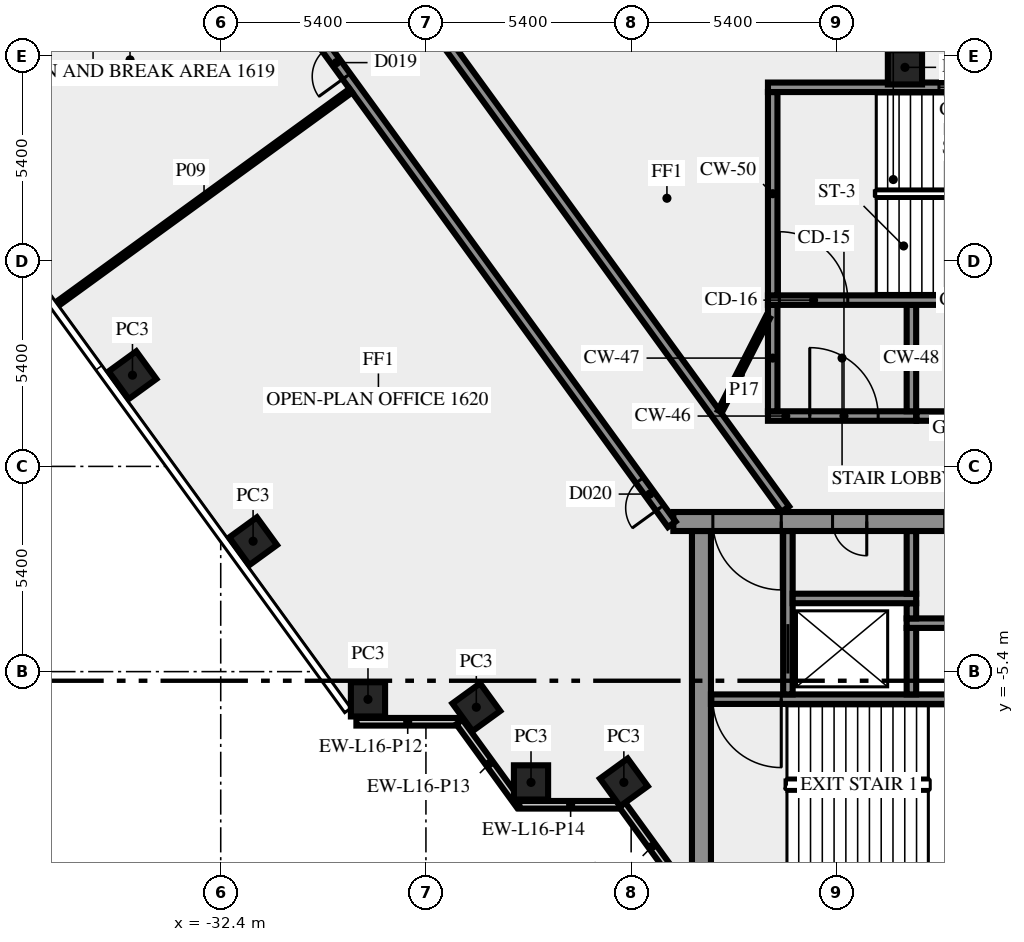
"""IFC4 building model, lengths in metres.
Left out: names, types, materials, properties, quantities, classifications, styles, units other than length and angle.
Written with IfcOpenShell. Run it as: python <this file> out.ifc"""

import sys

from ifc_helpers import new_model, si_unit, direction, frame, frame_2d, origin, origin_2d, place, context, subcontext, project, spatial, rectangle, extrude, element, fill, save


model = new_model("IFC4")
c1 = context("Model", 3, precision=1e-05, world=origin(), true_north=direction((0.0, 1.0)))
c2 = subcontext(c1, "Body", "Model", "MODEL_VIEW")
j1 = project(units=[si_unit("LENGTHUNIT", "METRE"), si_unit("PLANEANGLEUNIT", "RADIAN")], contexts=[c1])
p1 = place(None, origin())
s1 = spatial("IfcSite", under=j1, at=p1, CompositionType="ELEMENT")
p2 = place(p1, origin())
s2 = spatial("IfcBuilding", under=s1, at=p2, CompositionType="ELEMENT")
p3 = place(p2, frame((0.0, 0.0, 71.0)))
s3 = spatial("IfcBuildingStorey", under=s2, at=p3, CompositionType="ELEMENT", Elevation=71.0)
for number, where, z_axis, x_axis in (
    (1, (-34.722, 2.4, 0.0), (0.0, 0.0, 1.0), (0.588, -0.809, 0.0)),
    (2, (-31.548, -1.969, 0.0), (0.0, 0.0, 1.0), (0.588, -0.809, 0.0)),
    (3, (-28.525, -6.13, 0.0), (0.0, 0.0, 1.0), (1.0, 0.0, 0.0)),
    (4, (-25.674, -6.337, 0.0), (0.0, 0.0, 1.0), (0.588, -0.809, 0.0)),
    (5, (-24.235, -8.315, 0.0), (0.0, 0.0, 1.0), (1.0, 0.0, 0.0)),
    (6, (-21.792, -8.315, 0.0), (0.0, 0.0, 1.0), (0.588, -0.809, 0.0)),
    (7, (-14.395, 10.5, 0.0), (0.0, 0.0, 1.0), (-1.0, 0.0, 0.0)),
):
    element("IfcColumn", number, at=place(p3, frame(where, z_axis=z_axis, x_axis=x_axis)), inside=s3, PredefinedType="COLUMN", context=c2, shape_type="SweptSolid", body=[
        extrude(rectangle(XDim=0.9, YDim=0.9, at=origin_2d()), origin(), (0.0, 0.0, 1.0), 3.65),
    ])
p4 = place(p3, frame((-28.83, -6.719, 0.0), z_axis=(0.0, 0.0, 1.0), x_axis=(1.0, 0.0, 0.0)))
e8 = element("IfcWall", 8, at=p4, inside=s3, PredefinedType="SOLIDWALL", context=c2, shape_type="SweptSolid", body=[
    extrude(rectangle(XDim=2.7, YDim=0.2, at=frame_2d((1.35, 0.0))), origin(), (0.0, 0.0, 1.0), 3.65),
])
p5 = place(p3, frame((-26.12, -6.724, 0.0), z_axis=(0.0, 0.0, 1.0), x_axis=(0.587720002413, -0.809064397168, 0.0)))
e9 = element("IfcWall", 9, at=p5, inside=s3, PredefinedType="SOLIDWALL", context=c2, shape_type="SweptSolid", body=[
    extrude(rectangle(XDim=2.7, YDim=0.2, at=frame_2d((1.35, 0.0))), origin(), (0.0, 0.0, 1.0), 3.65),
])
p6 = place(p3, frame((-24.543, -8.904, 0.0), z_axis=(0.0, 0.0, 1.0), x_axis=(1.0, 0.0, 0.0)))
e10 = element("IfcWall", 10, at=p6, inside=s3, PredefinedType="SOLIDWALL", context=c2, shape_type="SweptSolid", body=[
    extrude(rectangle(XDim=2.7, YDim=0.2, at=frame_2d((1.35, 0.0))), origin(), (0.0, 0.0, 1.0), 3.65),
])
p7 = place(p3, frame((-21.833, -8.909, 0.0), z_axis=(0.0, 0.0, 1.0), x_axis=(0.587766567315, -0.809030569476, 0.0)))
e11 = element("IfcWall", 11, at=p7, inside=s3, PredefinedType="SOLIDWALL", context=c2, shape_type="SweptSolid", body=[
    extrude(rectangle(XDim=2.688, YDim=0.2, at=frame_2d((1.344, 0.0))), origin(), (0.0, 0.0, 1.0), 3.65),
])
p8 = place(p3, frame((-19.75, -10.5, 0.0), z_axis=(0.0, 0.0, 1.0), x_axis=(0.0, 1.0, 0.0)))
e12 = element("IfcWall", 12, at=p8, inside=s3, PredefinedType="SHEAR", context=c2, shape_type="SweptSolid", body=[
    extrude(rectangle(XDim=8.8, YDim=0.5, at=frame_2d((4.4, 0.0))), origin(), (0.0, 0.0, 1.0), 3.65),
])
p9 = place(p3, frame((-11.45, -6.125, 0.0), z_axis=(0.0, 0.0, 1.0), x_axis=(-1.0, 0.0, 0.0)))
e13 = element("IfcWall", 13, at=p9, inside=s3, PredefinedType="SHEAR", context=c2, shape_type="SweptSolid", body=[
    extrude(rectangle(XDim=8.05, YDim=0.25, at=frame_2d((4.025, 0.0))), origin(), (0.0, 0.0, 1.0), 3.65),
])
p10 = place(p9, frame((6.2, 0.0, 0.0)))
e14 = element("IfcOpeningElement", 14, at=p10, cuts=e13, PredefinedType="OPENING", context=c2, shape_type="SweptSolid", body=[
    extrude(rectangle(XDim=1.8, YDim=2.1, at=frame_2d((0.9, 1.05))), frame((0.0, 0.135, 0.0), z_axis=(0.0, -1.0, 0.0), x_axis=(1.0, 0.0, 0.0)), (0.0, 0.0, 1.0), 0.27),
])
p11 = place(p3, frame((-17.475, -6.0, 0.0), z_axis=(0.0, 0.0, 1.0), x_axis=(0.0, 1.0, 0.0)))
e15 = element("IfcWall", 15, at=p11, inside=s3, PredefinedType="SHEAR", context=c2, shape_type="SweptSolid", body=[
    extrude(rectangle(XDim=4.3, YDim=0.25, at=frame_2d((2.15, 0.0))), origin(), (0.0, 0.0, 1.0), 3.65),
])
p12 = place(p11, frame((0.55, 0.0, 0.0)))
e16 = element("IfcOpeningElement", 16, at=p12, cuts=e15, PredefinedType="OPENING", context=c2, shape_type="SweptSolid", body=[
    extrude(rectangle(XDim=1.3, YDim=2.1, at=frame_2d((0.65, 1.05))), frame((0.0, 0.135, 0.0), z_axis=(0.0, -1.0, 0.0), x_axis=(1.0, 0.0, 0.0)), (0.0, 0.0, 1.0), 0.27),
])
p13 = place(p3, frame((-14.225, -6.0, 0.0), z_axis=(0.0, 0.0, 1.0), x_axis=(0.0, 1.0, 0.0)))
e17 = element("IfcWall", 17, at=p13, inside=s3, PredefinedType="SHEAR", context=c2, shape_type="SweptSolid", body=[
    extrude(rectangle(XDim=1.75, YDim=0.25, at=frame_2d((0.875, 0.0))), origin(), (0.0, 0.0, 1.0), 3.65),
])
p14 = place(p3, frame((-14.35, -4.125, 0.0), z_axis=(0.0, 0.0, 1.0), x_axis=(1.0, 0.0, 0.0)))
e18 = element("IfcWall", 18, at=p14, inside=s3, PredefinedType="SHEAR", context=c2, shape_type="SweptSolid", body=[
    extrude(rectangle(XDim=10.4, YDim=0.25, at=frame_2d((5.2, 0.0))), origin(), (0.0, 0.0, 1.0), 3.65),
])
p15 = place(p14, frame((3.5, 0.0, 0.0)))
e19 = element("IfcOpeningElement", 19, at=p15, cuts=e18, PredefinedType="OPENING", context=c2, shape_type="SweptSolid", body=[
    extrude(rectangle(XDim=1.1, YDim=2.1, at=frame_2d((0.55, 1.05))), frame((0.0, 0.135, 0.0), z_axis=(0.0, -1.0, 0.0), x_axis=(1.0, 0.0, 0.0)), (0.0, 0.0, 1.0), 0.27),
])
p16 = place(p14, frame((6.0, 0.0, 0.0)))
e20 = element("IfcOpeningElement", 20, at=p16, cuts=e18, PredefinedType="OPENING", context=c2, shape_type="SweptSolid", body=[
    extrude(rectangle(XDim=1.1, YDim=2.1, at=frame_2d((0.55, 1.05))), frame((0.0, 0.135, 0.0), z_axis=(0.0, -1.0, 0.0), x_axis=(1.0, 0.0, 0.0)), (0.0, 0.0, 1.0), 0.27),
])
p17 = place(p14, frame((8.5, 0.0, 0.0)))
e21 = element("IfcOpeningElement", 21, at=p17, cuts=e18, PredefinedType="OPENING", context=c2, shape_type="SweptSolid", body=[
    extrude(rectangle(XDim=1.1, YDim=2.1, at=frame_2d((0.55, 1.05))), frame((0.0, 0.135, 0.0), z_axis=(0.0, -1.0, 0.0), x_axis=(1.0, 0.0, 0.0)), (0.0, 0.0, 1.0), 0.27),
])
p18 = place(p3, frame((-14.225, -4.0, 0.0), z_axis=(0.0, 0.0, 1.0), x_axis=(0.0, 1.0, 0.0)))
e22 = element("IfcWall", 22, at=p18, inside=s3, PredefinedType="SHEAR", context=c2, shape_type="SweptSolid", body=[
    extrude(rectangle(XDim=0.4, YDim=0.25, at=frame_2d((0.2, 0.0))), origin(), (0.0, 0.0, 1.0), 3.65),
])
p19 = place(p3, frame((-17.35, -3.475, 0.0), z_axis=(0.0, 0.0, 1.0), x_axis=(1.0, 0.0, 0.0)))
e23 = element("IfcWall", 23, at=p19, inside=s3, PredefinedType="SHEAR", context=c2, shape_type="SweptSolid", body=[
    extrude(rectangle(XDim=3.25, YDim=0.25, at=frame_2d((1.625, 0.0))), origin(), (0.0, 0.0, 1.0), 3.65),
])
p20 = place(p3, frame((-14.225, -3.35, 0.0), z_axis=(0.0, 0.0, 1.0), x_axis=(0.0, 1.0, 0.0)))
e24 = element("IfcWall", 24, at=p20, inside=s3, PredefinedType="SHEAR", context=c2, shape_type="SweptSolid", body=[
    extrude(rectangle(XDim=1.65, YDim=0.25, at=frame_2d((0.825, 0.0))), origin(), (0.0, 0.0, 1.0), 3.65),
])
p21 = place(p3, frame((20.49, -1.45, 0.0), z_axis=(0.0, 0.0, 1.0), x_axis=(-1.0, 0.0, 0.0)))
e25 = element("IfcWall", 25, at=p21, inside=s3, PredefinedType="SHEAR", context=c2, shape_type="SweptSolid", body=[
    extrude(rectangle(XDim=40.98, YDim=0.5, at=frame_2d((20.49, 0.0))), origin(), (0.0, 0.0, 1.0), 3.65),
])
p22 = place(p21, frame((38.14, 0.0, 0.0)))
e26 = element("IfcOpeningElement", 26, at=p22, cuts=e25, PredefinedType="OPENING", context=c2, shape_type="SweptSolid", body=[
    extrude(rectangle(XDim=1.8, YDim=2.1, at=frame_2d((0.9, 1.05))), frame((0.0, 0.26, 0.0), z_axis=(0.0, -1.0, 0.0), x_axis=(1.0, 0.0, 0.0)), (0.0, 0.0, 1.0), 0.52),
])
p23 = place(p21, frame((35.89, 0.0, 0.0)))
e27 = element("IfcOpeningElement", 27, at=p23, cuts=e25, PredefinedType="OPENING", context=c2, shape_type="SweptSolid", body=[
    extrude(rectangle(XDim=0.9, YDim=2.1, at=frame_2d((0.45, 1.05))), frame((0.0, 0.26, 0.0), z_axis=(0.0, -1.0, 0.0), x_axis=(1.0, 0.0, 0.0)), (0.0, 0.0, 1.0), 0.52),
])
p24 = place(p21, frame((32.94, 0.0, 0.0)))
e28 = element("IfcOpeningElement", 28, at=p24, cuts=e25, PredefinedType="OPENING", context=c2, shape_type="SweptSolid", body=[
    extrude(rectangle(XDim=0.9, YDim=2.1, at=frame_2d((0.45, 1.05))), frame((0.0, 0.26, 0.0), z_axis=(0.0, -1.0, 0.0), x_axis=(1.0, 0.0, 0.0)), (0.0, 0.0, 1.0), 0.52),
])
p25 = place(p21, frame((21.765, 0.0, 0.0)))
e29 = element("IfcOpeningElement", 29, at=p25, cuts=e25, PredefinedType="OPENING", context=c2, shape_type="SweptSolid", body=[
    extrude(rectangle(XDim=2.0, YDim=2.1, at=frame_2d((1.0, 1.05))), frame((0.0, 0.26, 0.0), z_axis=(0.0, -1.0, 0.0), x_axis=(1.0, 0.0, 0.0)), (0.0, 0.0, 1.0), 0.52),
])
p26 = place(p21, frame((7.14, 0.0, 0.0)))
e30 = element("IfcOpeningElement", 30, at=p26, cuts=e25, PredefinedType="OPENING", context=c2, shape_type="SweptSolid", body=[
    extrude(rectangle(XDim=0.9, YDim=2.1, at=frame_2d((0.45, 1.05))), frame((0.0, 0.26, 0.0), z_axis=(0.0, -1.0, 0.0), x_axis=(1.0, 0.0, 0.0)), (0.0, 0.0, 1.0), 0.52),
])
p27 = place(p21, frame((5.028, 0.0, 0.0)))
e31 = element("IfcOpeningElement", 31, at=p27, cuts=e25, PredefinedType="OPENING", context=c2, shape_type="SweptSolid", body=[
    extrude(rectangle(XDim=0.8, YDim=2.1, at=frame_2d((0.4, 1.05))), frame((0.0, 0.26, 0.0), z_axis=(0.0, -1.0, 0.0), x_axis=(1.0, 0.0, 0.0)), (0.0, 0.0, 1.0), 0.52),
])
p28 = place(p21, frame((3.452, 0.0, 0.0)))
e32 = element("IfcOpeningElement", 32, at=p28, cuts=e25, PredefinedType="OPENING", context=c2, shape_type="SweptSolid", body=[
    extrude(rectangle(XDim=0.8, YDim=2.1, at=frame_2d((0.4, 1.05))), frame((0.0, 0.26, 0.0), z_axis=(0.0, -1.0, 0.0), x_axis=(1.0, 0.0, 0.0)), (0.0, 0.0, 1.0), 0.52),
])
p29 = place(p21, frame((1.04, 0.0, 0.0)))
e33 = element("IfcOpeningElement", 33, at=p29, cuts=e25, PredefinedType="OPENING", context=c2, shape_type="SweptSolid", body=[
    extrude(rectangle(XDim=1.8, YDim=2.1, at=frame_2d((0.9, 1.05))), frame((0.0, 0.26, 0.0), z_axis=(0.0, -1.0, 0.0), x_axis=(1.0, 0.0, 0.0)), (0.0, 0.0, 1.0), 0.52),
])
p30 = place(p3, frame((-18.0, 1.325, 0.0), z_axis=(0.0, 0.0, 1.0), x_axis=(1.0, 0.0, 0.0)))
e34 = element("IfcWall", 34, at=p30, inside=s3, PredefinedType="SHEAR", context=c2, shape_type="SweptSolid", body=[
    extrude(rectangle(XDim=3.9, YDim=0.25, at=frame_2d((1.95, 0.0))), origin(), (0.0, 0.0, 1.0), 3.65),
])
p31 = place(p30, frame((1.1, 0.0, 0.0)))
e35 = element("IfcOpeningElement", 35, at=p31, cuts=e34, PredefinedType="OPENING", context=c2, shape_type="SweptSolid", body=[
    extrude(rectangle(XDim=1.8, YDim=2.1, at=frame_2d((0.9, 1.05))), frame((0.0, 0.135, 0.0), z_axis=(0.0, -1.0, 0.0), x_axis=(1.0, 0.0, 0.0)), (0.0, 0.0, 1.0), 0.27),
])
for number, where, z_axis, x_axis in (
    (36, (-17.875, 1.45, 0.0), (0.0, 0.0, 1.0), (0.0, 1.0, 0.0)),
    (37, (-14.225, 1.45, 0.0), (0.0, 0.0, 1.0), (0.0, 1.0, 0.0)),
):
    element("IfcWall", number, at=place(p3, frame(where, z_axis=z_axis, x_axis=x_axis)), inside=s3, PredefinedType="SHEAR", context=c2, shape_type="SweptSolid", body=[
        extrude(rectangle(XDim=2.8, YDim=0.25, at=frame_2d((1.4, 0.0))), origin(), (0.0, 0.0, 1.0), 3.65),
    ])
p32 = place(p3, frame((-18.0, 4.375, 0.0), z_axis=(0.0, 0.0, 1.0), x_axis=(1.0, 0.0, 0.0)))
e38 = element("IfcWall", 38, at=p32, inside=s3, PredefinedType="SHEAR", context=c2, shape_type="SweptSolid", body=[
    extrude(rectangle(XDim=10.5, YDim=0.25, at=frame_2d((5.25, 0.0))), origin(), (0.0, 0.0, 1.0), 3.65),
])
p33 = place(p32, frame((0.3, 0.0, 0.0)))
e39 = element("IfcOpeningElement", 39, at=p33, cuts=e38, PredefinedType="OPENING", context=c2, shape_type="SweptSolid", body=[
    extrude(rectangle(XDim=1.8, YDim=2.1, at=frame_2d((0.9, 1.05))), frame((0.0, 0.135, 0.0), z_axis=(0.0, -1.0, 0.0), x_axis=(1.0, 0.0, 0.0)), (0.0, 0.0, 1.0), 0.27),
])
p34 = place(p3, frame((-17.875, 4.5, 0.0), z_axis=(0.0, 0.0, 1.0), x_axis=(0.0, 1.0, 0.0)))
e40 = element("IfcWall", 40, at=p34, inside=s3, PredefinedType="SHEAR", context=c2, shape_type="SweptSolid", body=[
    extrude(rectangle(XDim=5.35, YDim=0.25, at=frame_2d((2.675, 0.0))), origin(), (0.0, 0.0, 1.0), 3.65),
])
p35 = place(p3, frame((-18.0, 9.975, 0.0), z_axis=(0.0, 0.0, 1.0), x_axis=(1.0, 0.0, 0.0)))
e41 = element("IfcWall", 41, at=p35, inside=s3, PredefinedType="SHEAR", context=c2, shape_type="SweptSolid", body=[
    extrude(rectangle(XDim=10.5, YDim=0.25, at=frame_2d((5.25, 0.0))), origin(), (0.0, 0.0, 1.0), 3.65),
])
p36 = place(p35, frame((4.5, 0.0, 1.0)))
e42 = element("IfcOpeningElement", 42, at=p36, cuts=e41, PredefinedType="OPENING", context=c2, shape_type="SweptSolid", body=[
    extrude(rectangle(XDim=1.2, YDim=1.2, at=frame_2d((0.6, 0.6))), frame((0.0, 0.135, 0.0), z_axis=(0.0, -1.0, 0.0), x_axis=(1.0, 0.0, 0.0)), (0.0, 0.0, 1.0), 0.27),
])
p37 = place(p3, frame((-20.531, -1.523, 0.0), z_axis=(0.0, 0.0, 1.0), x_axis=(-0.587784593204, 0.809017473231, 0.0)))
e43 = element("IfcWall", 43, at=p37, inside=s3, PredefinedType="SOLIDWALL", context=c2, shape_type="SweptSolid", body=[
    extrude(rectangle(XDim=44.67, YDim=0.25, at=frame_2d((22.335, 0.0))), origin(), (0.0, 0.0, 1.0), 3.65),
])
p38 = place(p37, frame((0.533, 0.0, 0.0)))
e44 = element("IfcOpeningElement", 44, at=p38, cuts=e43, PredefinedType="OPENING", context=c2, shape_type="SweptSolid", body=[
    extrude(rectangle(XDim=0.9, YDim=2.1, at=frame_2d((0.45, 1.05))), frame((0.0, 0.135, 0.0), z_axis=(0.0, -1.0, 0.0), x_axis=(1.0, 0.0, 0.0)), (0.0, 0.0, 1.0), 0.27),
])
p39 = place(p37, frame((32.531, 0.0, 0.0)))
e45 = element("IfcOpeningElement", 45, at=p39, cuts=e43, PredefinedType="OPENING", context=c2, shape_type="SweptSolid", body=[
    extrude(rectangle(XDim=1.8, YDim=2.1, at=frame_2d((0.9, 1.05))), frame((0.0, 0.135, 0.0), z_axis=(0.0, -1.0, 0.0), x_axis=(1.0, 0.0, 0.0)), (0.0, 0.0, 1.0), 0.27),
])
p40 = place(p37, frame((14.566, 0.0, 0.0)))
e46 = element("IfcOpeningElement", 46, at=p40, cuts=e43, PredefinedType="OPENING", context=c2, shape_type="SweptSolid", body=[
    extrude(rectangle(XDim=0.9, YDim=2.1, at=frame_2d((0.45, 1.05))), frame((0.0, 0.135, 0.0), z_axis=(0.0, -1.0, 0.0), x_axis=(1.0, 0.0, 0.0)), (0.0, 0.0, 1.0), 0.27),
])
p41 = place(p3, frame((-37.232, 25.972, 0.0), z_axis=(0.0, 0.0, 1.0), x_axis=(0.587786323093, -0.809016216391, 0.0)))
e47 = element("IfcWall", 47, at=p41, inside=s3, PredefinedType="SOLIDWALL", context=c2, shape_type="SweptSolid", body=[
    extrude(rectangle(XDim=33.493, YDim=0.25, at=frame_2d((16.747, 0.0))), origin(), (0.0, 0.0, 1.0), 3.65),
])
p42 = place(p41, frame((16.435, 0.0, 0.0)))
e48 = element("IfcOpeningElement", 48, at=p42, cuts=e47, PredefinedType="OPENING", context=c2, shape_type="SweptSolid", body=[
    extrude(rectangle(XDim=0.9, YDim=2.1, at=frame_2d((0.45, 1.05))), frame((0.0, 0.135, 0.0), z_axis=(0.0, -1.0, 0.0), x_axis=(1.0, 0.0, 0.0)), (0.0, 0.0, 1.0), 0.27),
])
p43 = place(p41, frame((7.137, 0.0, 0.0)))
e49 = element("IfcOpeningElement", 49, at=p43, cuts=e47, PredefinedType="OPENING", context=c2, shape_type="SweptSolid", body=[
    extrude(rectangle(XDim=1.8, YDim=2.1, at=frame_2d((0.9, 1.05))), frame((0.0, 0.135, 0.0), z_axis=(0.0, -1.0, 0.0), x_axis=(1.0, 0.0, 0.0)), (0.0, 0.0, 1.0), 0.27),
])
p44 = place(p3, frame((-14.09, 1.325, 0.0), z_axis=(0.0, 0.0, 1.0), x_axis=(1.0, 0.0, 0.0)))
e50 = element("IfcWall", 50, at=p44, inside=s3, PredefinedType="SOLIDWALL", context=c2, shape_type="SweptSolid", body=[
    extrude(rectangle(XDim=28.18, YDim=0.25, at=frame_2d((14.09, 0.0))), origin(), (0.0, 0.0, 1.0), 3.65),
])
p45 = place(p44, frame((20.038, 0.0, 0.0)))
e51 = element("IfcOpeningElement", 51, at=p45, cuts=e50, PredefinedType="OPENING", context=c2, shape_type="SweptSolid", body=[
    extrude(rectangle(XDim=0.9, YDim=2.1, at=frame_2d((0.45, 1.05))), frame((0.0, 0.135, 0.0), z_axis=(0.0, -1.0, 0.0), x_axis=(1.0, 0.0, 0.0)), (0.0, 0.0, 1.0), 0.27),
])
p46 = place(p44, frame((7.242, 0.0, 0.0)))
e52 = element("IfcOpeningElement", 52, at=p46, cuts=e50, PredefinedType="OPENING", context=c2, shape_type="SweptSolid", body=[
    extrude(rectangle(XDim=0.9, YDim=2.1, at=frame_2d((0.45, 1.05))), frame((0.0, 0.135, 0.0), z_axis=(0.0, -1.0, 0.0), x_axis=(1.0, 0.0, 0.0)), (0.0, 0.0, 1.0), 0.27),
])
p47 = place(p44, frame((21.638, 0.0, 0.0)))
e53 = element("IfcOpeningElement", 53, at=p47, cuts=e50, PredefinedType="OPENING", context=c2, shape_type="SweptSolid", body=[
    extrude(rectangle(XDim=0.9, YDim=2.1, at=frame_2d((0.45, 1.05))), frame((0.0, 0.135, 0.0), z_axis=(0.0, -1.0, 0.0), x_axis=(1.0, 0.0, 0.0)), (0.0, 0.0, 1.0), 0.27),
])
p48 = place(p44, frame((5.642, 0.0, 0.0)))
e54 = element("IfcOpeningElement", 54, at=p48, cuts=e50, PredefinedType="OPENING", context=c2, shape_type="SweptSolid", body=[
    extrude(rectangle(XDim=0.9, YDim=2.1, at=frame_2d((0.45, 1.05))), frame((0.0, 0.135, 0.0), z_axis=(0.0, -1.0, 0.0), x_axis=(1.0, 0.0, 0.0)), (0.0, 0.0, 1.0), 0.27),
])
p49 = place(p3, frame((-28.976, 9.888, 0.0), z_axis=(0.0, 0.0, 1.0), x_axis=(-0.808998008689, -0.58781138296, 0.0)))
e55 = element("IfcWall", 55, at=p49, inside=s3, PredefinedType="PARTITIONING", context=c2, shape_type="SweptSolid", body=[
    extrude(rectangle(XDim=9.55, YDim=0.12, at=frame_2d((4.775, 0.0))), origin(), (0.0, 0.0, 1.0), 2.75),
])
p50 = place(p3, frame((-19.261, 1.45, 0.0), z_axis=(0.0, 0.0, 1.0), x_axis=(0.453950796792, 0.891026752736, 0.0)))
e56 = element("IfcWall", 56, at=p50, inside=s3, PredefinedType="PARTITIONING", context=c2, shape_type="SweptSolid", body=[
    extrude(rectangle(XDim=2.778, YDim=0.12, at=frame_2d((1.389, 0.0))), origin(), (0.0, 0.0, 1.0), 3.65),
])
p51 = place(p10, origin())
e57 = element("IfcDoor", 57, at=p51, inside=s3, OperationType="DOUBLE_DOOR_SINGLE_SWING", PredefinedType="DOOR", context=c2, shape_type="SweptSolid", body=[
    extrude(rectangle(XDim=1.8, YDim=2.1, at=frame_2d((0.9, 1.05))), frame((0.0, 0.025, 0.0), z_axis=(0.0, -1.0, 0.0), x_axis=(1.0, 0.0, 0.0)), (0.0, 0.0, 1.0), 0.05),
])
fill(e14, e57)
p52 = place(p12, origin())
e58 = element("IfcDoor", 58, at=p52, inside=s3, OperationType="DOUBLE_DOOR_SLIDING", PredefinedType="DOOR", context=c2, shape_type="SweptSolid", body=[
    extrude(rectangle(XDim=1.3, YDim=2.1, at=frame_2d((0.65, 1.05))), frame((0.0, 0.025, 0.0), z_axis=(0.0, -1.0, 0.0), x_axis=(1.0, 0.0, 0.0)), (0.0, 0.0, 1.0), 0.05),
])
fill(e16, e58)
p53 = place(p22, origin())
e59 = element("IfcDoor", 59, at=p53, inside=s3, OperationType="DOUBLE_DOOR_SINGLE_SWING", PredefinedType="DOOR", context=c2, shape_type="SweptSolid", body=[
    extrude(rectangle(XDim=1.8, YDim=2.1, at=frame_2d((0.9, 1.05))), frame((0.0, 0.025, 0.0), z_axis=(0.0, -1.0, 0.0), x_axis=(1.0, 0.0, 0.0)), (0.0, 0.0, 1.0), 0.05),
])
fill(e26, e59)
p54 = place(p23, origin())
e60 = element("IfcDoor", 60, at=p54, inside=s3, OperationType="SINGLE_SWING_RIGHT", PredefinedType="DOOR", context=c2, shape_type="SweptSolid", body=[
    extrude(rectangle(XDim=0.9, YDim=2.1, at=frame_2d((0.45, 1.05))), frame((0.0, 0.025, 0.0), z_axis=(0.0, -1.0, 0.0), x_axis=(1.0, 0.0, 0.0)), (0.0, 0.0, 1.0), 0.05),
])
fill(e27, e60)
p55 = place(p31, origin())
e61 = element("IfcDoor", 61, at=p55, inside=s3, OperationType="DOUBLE_DOOR_SINGLE_SWING", PredefinedType="DOOR", context=c2, shape_type="SweptSolid", body=[
    extrude(rectangle(XDim=1.8, YDim=2.1, at=frame_2d((0.9, 1.05))), frame((0.0, 0.025, 0.0), z_axis=(0.0, -1.0, 0.0), x_axis=(1.0, 0.0, 0.0)), (0.0, 0.0, 1.0), 0.05),
])
fill(e35, e61)
p56 = place(p33, origin())
e62 = element("IfcDoor", 62, at=p56, inside=s3, OperationType="DOUBLE_DOOR_SINGLE_SWING", PredefinedType="DOOR", context=c2, shape_type="SweptSolid", body=[
    extrude(rectangle(XDim=1.8, YDim=2.1, at=frame_2d((0.9, 1.05))), frame((0.0, 0.025, 0.0), z_axis=(0.0, -1.0, 0.0), x_axis=(1.0, 0.0, 0.0)), (0.0, 0.0, 1.0), 0.05),
])
fill(e39, e62)
p57 = place(p36, origin())
e63 = element("IfcWindow", 63, at=p57, inside=s3, PartitioningType="SINGLE_PANEL", PredefinedType="WINDOW", context=c2, shape_type="SweptSolid", body=[
    extrude(rectangle(XDim=1.2, YDim=1.2, at=frame_2d((0.6, 0.6))), frame((0.0, 0.03, 0.0), z_axis=(0.0, -1.0, 0.0), x_axis=(1.0, 0.0, 0.0)), (0.0, 0.0, 1.0), 0.06),
])
fill(e42, e63)
p58 = place(p38, origin())
e64 = element("IfcDoor", 64, at=p58, inside=s3, OperationType="SINGLE_SWING_LEFT", PredefinedType="DOOR", context=c2, shape_type="SweptSolid", body=[
    extrude(rectangle(XDim=0.9, YDim=2.1, at=frame_2d((0.45, 1.05))), frame((0.0, 0.025, 0.0), z_axis=(0.0, -1.0, 0.0), x_axis=(1.0, 0.0, 0.0)), (0.0, 0.0, 1.0), 0.05),
])
fill(e44, e64)
p59 = place(p40, origin())
e65 = element("IfcDoor", 65, at=p59, inside=s3, OperationType="SINGLE_SWING_LEFT", PredefinedType="DOOR", context=c2, shape_type="SweptSolid", body=[
    extrude(rectangle(XDim=0.9, YDim=2.1, at=frame_2d((0.45, 1.05))), frame((0.0, 0.025, 0.0), z_axis=(0.0, -1.0, 0.0), x_axis=(1.0, 0.0, 0.0)), (0.0, 0.0, 1.0), 0.05),
])
fill(e46, e65)
save(model, sys.argv[1])
